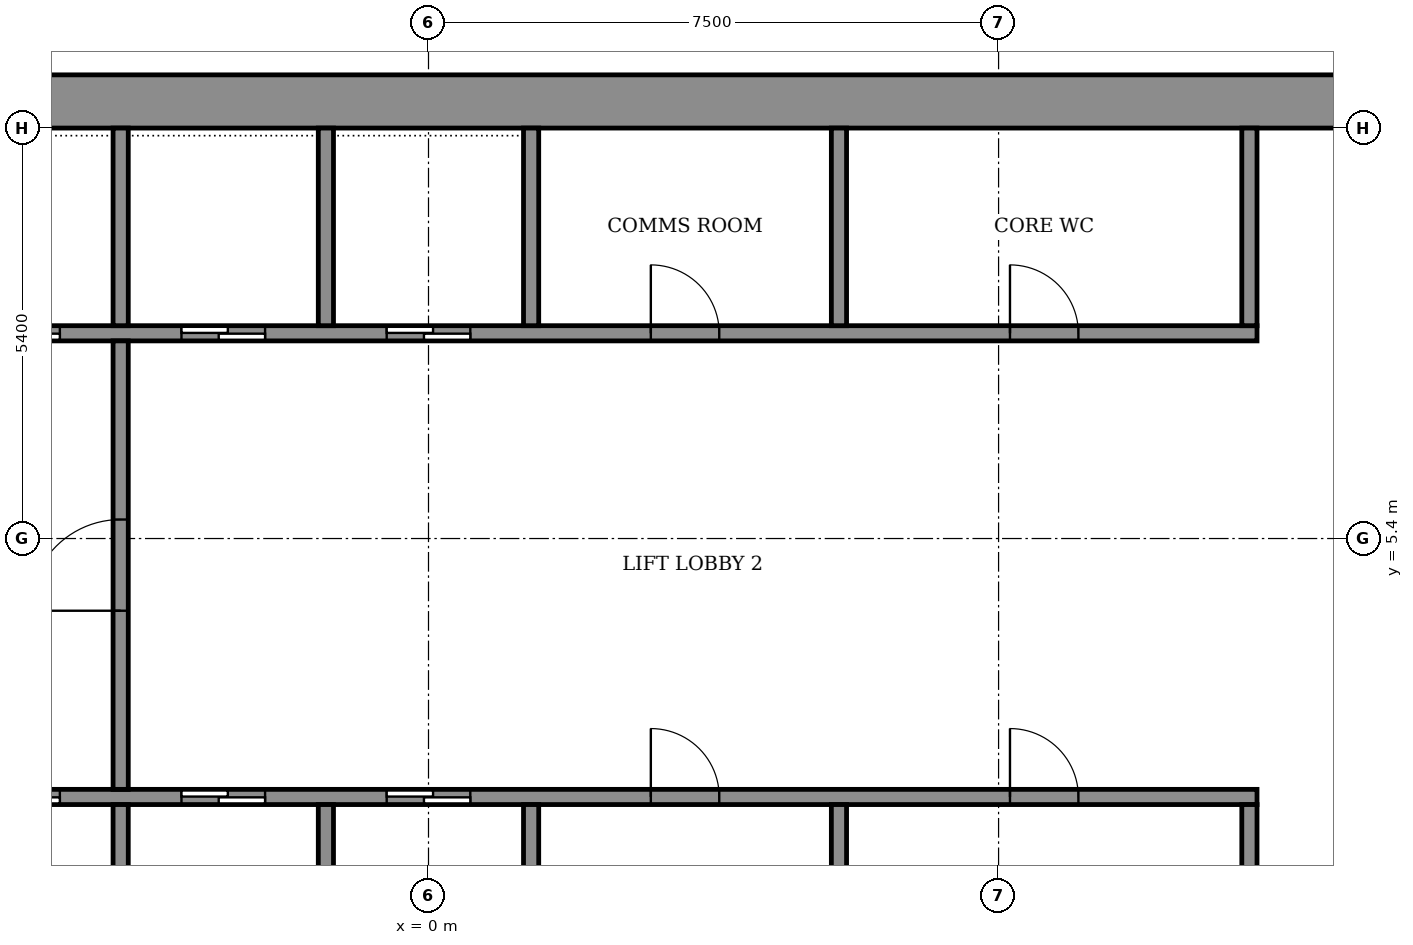
"""IFC4 building model, lengths in metres.
Left out: names, types, materials, properties, quantities, classifications, styles, units other than length and angle.
Written with IfcOpenShell. Run it as: python <this file> out.ifc"""

import sys

from ifc_helpers import new_model, si_unit, direction, frame, frame_2d, origin, place, context, subcontext, project, spatial, rectangle, extrude, element, fill, save


model = new_model("IFC4")
c1 = context("Model", 3, precision=1e-05, world=origin(), true_north=direction((0.0, 1.0)))
c2 = subcontext(c1, "Body", "Model", "MODEL_VIEW")
j1 = project(units=[si_unit("LENGTHUNIT", "METRE"), si_unit("PLANEANGLEUNIT", "RADIAN")], contexts=[c1])
p1 = place(None, origin())
s1 = spatial("IfcSite", under=j1, at=p1, CompositionType="ELEMENT")
p2 = place(p1, origin())
s2 = spatial("IfcBuilding", under=s1, at=p2, CompositionType="ELEMENT")
p3 = place(p2, frame((0.0, 0.0, 268.1)))
s3 = spatial("IfcBuildingStorey", under=s2, at=p3, CompositionType="ELEMENT", Elevation=268.1)
p4 = place(p3, frame((-14.5, 11.15, 0.0), z_axis=(0.0, 0.0, 1.0), x_axis=(1.0, 0.0, 0.0)))
e1 = element("IfcWall", 1, at=p4, inside=s3, PredefinedType="SHEAR", context=c2, shape_type="SweptSolid", body=[
    extrude(rectangle(XDim=29.0, YDim=0.7, at=frame_2d((14.5, 0.0))), origin(), (0.0, 0.0, 1.0), 3.6),
])
p5 = place(p3, frame((-10.9, 2.0, 0.0), z_axis=(0.0, 0.0, 1.0), x_axis=(1.0, 0.0, 0.0)))
e2 = element("IfcWall", 2, at=p5, inside=s3, PredefinedType="SHEAR", context=c2, shape_type="SweptSolid", body=[
    extrude(rectangle(XDim=21.8, YDim=0.2, at=frame_2d((10.9, 0.0))), origin(), (0.0, 0.0, 1.0), 3.05),
])
p6 = place(p5, frame((4.95, 0.0, 0.0)))
e3 = element("IfcOpeningElement", 3, at=p6, cuts=e2, PredefinedType="OPENING", context=c2, shape_type="SweptSolid", body=[
    extrude(rectangle(XDim=1.1, YDim=2.1, at=frame_2d((0.55, 1.05))), frame((0.0, 0.11, 0.0), z_axis=(0.0, -1.0, 0.0), x_axis=(1.0, 0.0, 0.0)), (0.0, 0.0, 1.0), 0.22),
])
p7 = place(p5, frame((7.65, 0.0, 0.0)))
e4 = element("IfcOpeningElement", 4, at=p7, cuts=e2, PredefinedType="OPENING", context=c2, shape_type="SweptSolid", body=[
    extrude(rectangle(XDim=1.1, YDim=2.1, at=frame_2d((0.55, 1.05))), frame((0.0, 0.11, 0.0), z_axis=(0.0, -1.0, 0.0), x_axis=(1.0, 0.0, 0.0)), (0.0, 0.0, 1.0), 0.22),
])
p8 = place(p5, frame((10.35, 0.0, 0.0)))
e5 = element("IfcOpeningElement", 5, at=p8, cuts=e2, PredefinedType="OPENING", context=c2, shape_type="SweptSolid", body=[
    extrude(rectangle(XDim=1.1, YDim=2.1, at=frame_2d((0.55, 1.05))), frame((0.0, 0.11, 0.0), z_axis=(0.0, -1.0, 0.0), x_axis=(1.0, 0.0, 0.0)), (0.0, 0.0, 1.0), 0.22),
])
p9 = place(p5, frame((1.675, 0.0, 0.0)))
e6 = element("IfcOpeningElement", 6, at=p9, cuts=e2, PredefinedType="OPENING", context=c2, shape_type="SweptSolid", body=[
    extrude(rectangle(XDim=0.9, YDim=2.1, at=frame_2d((0.45, 1.05))), frame((0.0, 0.11, 0.0), z_axis=(0.0, -1.0, 0.0), x_axis=(1.0, 0.0, 0.0)), (0.0, 0.0, 1.0), 0.22),
])
p10 = place(p5, frame((13.825, 0.0, 0.0)))
e7 = element("IfcOpeningElement", 7, at=p10, cuts=e2, PredefinedType="OPENING", context=c2, shape_type="SweptSolid", body=[
    extrude(rectangle(XDim=0.9, YDim=2.1, at=frame_2d((0.45, 1.05))), frame((0.0, 0.11, 0.0), z_axis=(0.0, -1.0, 0.0), x_axis=(1.0, 0.0, 0.0)), (0.0, 0.0, 1.0), 0.22),
])
p11 = place(p5, frame((18.55, 0.0, 0.0)))
e8 = element("IfcOpeningElement", 8, at=p11, cuts=e2, PredefinedType="OPENING", context=c2, shape_type="SweptSolid", body=[
    extrude(rectangle(XDim=0.9, YDim=2.1, at=frame_2d((0.45, 1.05))), frame((0.0, 0.11, 0.0), z_axis=(0.0, -1.0, 0.0), x_axis=(1.0, 0.0, 0.0)), (0.0, 0.0, 1.0), 0.22),
])
p12 = place(p3, frame((-10.9, 8.1, 0.0), z_axis=(0.0, 0.0, 1.0), x_axis=(1.0, 0.0, 0.0)))
e9 = element("IfcWall", 9, at=p12, inside=s3, PredefinedType="SHEAR", context=c2, shape_type="SweptSolid", body=[
    extrude(rectangle(XDim=21.8, YDim=0.2, at=frame_2d((10.9, 0.0))), origin(), (0.0, 0.0, 1.0), 3.05),
])
p13 = place(p12, frame((4.95, 0.0, 0.0)))
e10 = element("IfcOpeningElement", 10, at=p13, cuts=e9, PredefinedType="OPENING", context=c2, shape_type="SweptSolid", body=[
    extrude(rectangle(XDim=1.1, YDim=2.1, at=frame_2d((0.55, 1.05))), frame((0.0, 0.11, 0.0), z_axis=(0.0, -1.0, 0.0), x_axis=(1.0, 0.0, 0.0)), (0.0, 0.0, 1.0), 0.22),
])
p14 = place(p12, frame((7.65, 0.0, 0.0)))
e11 = element("IfcOpeningElement", 11, at=p14, cuts=e9, PredefinedType="OPENING", context=c2, shape_type="SweptSolid", body=[
    extrude(rectangle(XDim=1.1, YDim=2.1, at=frame_2d((0.55, 1.05))), frame((0.0, 0.11, 0.0), z_axis=(0.0, -1.0, 0.0), x_axis=(1.0, 0.0, 0.0)), (0.0, 0.0, 1.0), 0.22),
])
p15 = place(p12, frame((10.35, 0.0, 0.0)))
e12 = element("IfcOpeningElement", 12, at=p15, cuts=e9, PredefinedType="OPENING", context=c2, shape_type="SweptSolid", body=[
    extrude(rectangle(XDim=1.1, YDim=2.1, at=frame_2d((0.55, 1.05))), frame((0.0, 0.11, 0.0), z_axis=(0.0, -1.0, 0.0), x_axis=(1.0, 0.0, 0.0)), (0.0, 0.0, 1.0), 0.22),
])
p16 = place(p12, frame((1.675, 0.0, 0.0)))
e13 = element("IfcOpeningElement", 13, at=p16, cuts=e9, PredefinedType="OPENING", context=c2, shape_type="SweptSolid", body=[
    extrude(rectangle(XDim=0.9, YDim=2.1, at=frame_2d((0.45, 1.05))), frame((0.0, 0.11, 0.0), z_axis=(0.0, -1.0, 0.0), x_axis=(1.0, 0.0, 0.0)), (0.0, 0.0, 1.0), 0.22),
])
p17 = place(p12, frame((13.825, 0.0, 0.0)))
e14 = element("IfcOpeningElement", 14, at=p17, cuts=e9, PredefinedType="OPENING", context=c2, shape_type="SweptSolid", body=[
    extrude(rectangle(XDim=0.9, YDim=2.1, at=frame_2d((0.45, 1.05))), frame((0.0, 0.11, 0.0), z_axis=(0.0, -1.0, 0.0), x_axis=(1.0, 0.0, 0.0)), (0.0, 0.0, 1.0), 0.22),
])
p18 = place(p12, frame((18.55, 0.0, 0.0)))
e15 = element("IfcOpeningElement", 15, at=p18, cuts=e9, PredefinedType="OPENING", context=c2, shape_type="SweptSolid", body=[
    extrude(rectangle(XDim=0.9, YDim=2.1, at=frame_2d((0.45, 1.05))), frame((0.0, 0.11, 0.0), z_axis=(0.0, -1.0, 0.0), x_axis=(1.0, 0.0, 0.0)), (0.0, 0.0, 1.0), 0.22),
])
for number, where, z_axis, x_axis in (
    (16, (-4.05, -0.6, 0.0), (0.0, 0.0, 1.0), (0.0, 1.0, 0.0)),
    (17, (-1.35, -0.6, 0.0), (0.0, 0.0, 1.0), (0.0, 1.0, 0.0)),
    (18, (1.35, -0.6, 0.0), (0.0, 0.0, 1.0), (0.0, 1.0, 0.0)),
):
    element("IfcWall", number, at=place(p3, frame(where, z_axis=z_axis, x_axis=x_axis)), inside=s3, PredefinedType="SHEAR", context=c2, shape_type="SweptSolid", body=[
        extrude(rectangle(XDim=2.5, YDim=0.2, at=frame_2d((1.25, 0.0))), origin(), (0.0, 0.0, 1.0), 3.05),
    ])
for number, where, z_axis, x_axis in (
    (19, (5.4, -0.6, 0.0), (0.0, 0.0, 1.0), (0.0, 1.0, 0.0)),
    (20, (10.8, -0.6, 0.0), (0.0, 0.0, 1.0), (0.0, 1.0, 0.0)),
):
    element("IfcWall", number, at=place(p3, frame(where, z_axis=z_axis, x_axis=x_axis)), inside=s3, PredefinedType="STANDARD", context=c2, shape_type="SweptSolid", body=[
        extrude(rectangle(XDim=2.5, YDim=0.2, at=frame_2d((1.25, 0.0))), origin(), (0.0, 0.0, 1.0), 3.05),
    ])
for number, where, z_axis, x_axis in (
    (21, (-4.05, 8.2, 0.0), (0.0, 0.0, 1.0), (0.0, 1.0, 0.0)),
    (22, (-1.35, 8.2, 0.0), (0.0, 0.0, 1.0), (0.0, 1.0, 0.0)),
    (23, (1.35, 8.2, 0.0), (0.0, 0.0, 1.0), (0.0, 1.0, 0.0)),
):
    element("IfcWall", number, at=place(p3, frame(where, z_axis=z_axis, x_axis=x_axis)), inside=s3, PredefinedType="SHEAR", context=c2, shape_type="SweptSolid", body=[
        extrude(rectangle(XDim=2.6, YDim=0.2, at=frame_2d((1.3, 0.0))), origin(), (0.0, 0.0, 1.0), 3.05),
    ])
for number, where, z_axis, x_axis in (
    (24, (5.4, 8.2, 0.0), (0.0, 0.0, 1.0), (0.0, 1.0, 0.0)),
    (25, (10.8, 8.2, 0.0), (0.0, 0.0, 1.0), (0.0, 1.0, 0.0)),
):
    element("IfcWall", number, at=place(p3, frame(where, z_axis=z_axis, x_axis=x_axis)), inside=s3, PredefinedType="STANDARD", context=c2, shape_type="SweptSolid", body=[
        extrude(rectangle(XDim=2.6, YDim=0.2, at=frame_2d((1.3, 0.0))), origin(), (0.0, 0.0, 1.0), 3.05),
    ])
p19 = place(p3, frame((-4.05, 2.1, 0.0), z_axis=(0.0, 0.0, 1.0), x_axis=(0.0, 1.0, 0.0)))
e26 = element("IfcWall", 26, at=p19, inside=s3, PredefinedType="STANDARD", context=c2, shape_type="SweptSolid", body=[
    extrude(rectangle(XDim=5.9, YDim=0.2, at=frame_2d((2.95, 0.0))), origin(), (0.0, 0.0, 1.0), 3.05),
])
p20 = place(p19, frame((2.35, 0.0, 0.0)))
e27 = element("IfcOpeningElement", 27, at=p20, cuts=e26, PredefinedType="OPENING", context=c2, shape_type="SweptSolid", body=[
    extrude(rectangle(XDim=1.2, YDim=2.1, at=frame_2d((0.6, 1.05))), frame((0.0, 0.11, 0.0), z_axis=(0.0, -1.0, 0.0), x_axis=(1.0, 0.0, 0.0)), (0.0, 0.0, 1.0), 0.22),
])
p21 = place(p6, origin())
e28 = element("IfcDoor", 28, at=p21, inside=s3, OperationType="SLIDING_TO_LEFT", PredefinedType="DOOR", context=c2, shape_type="SweptSolid", body=[
    extrude(rectangle(XDim=1.1, YDim=2.1, at=frame_2d((0.55, 1.05))), frame((0.0, 0.025, 0.0), z_axis=(0.0, -1.0, 0.0), x_axis=(1.0, 0.0, 0.0)), (0.0, 0.0, 1.0), 0.05),
])
fill(e3, e28)
p22 = place(p7, origin())
e29 = element("IfcDoor", 29, at=p22, inside=s3, OperationType="SLIDING_TO_LEFT", PredefinedType="DOOR", context=c2, shape_type="SweptSolid", body=[
    extrude(rectangle(XDim=1.1, YDim=2.1, at=frame_2d((0.55, 1.05))), frame((0.0, 0.025, 0.0), z_axis=(0.0, -1.0, 0.0), x_axis=(1.0, 0.0, 0.0)), (0.0, 0.0, 1.0), 0.05),
])
fill(e4, e29)
p23 = place(p8, origin())
e30 = element("IfcDoor", 30, at=p23, inside=s3, OperationType="SLIDING_TO_LEFT", PredefinedType="DOOR", context=c2, shape_type="SweptSolid", body=[
    extrude(rectangle(XDim=1.1, YDim=2.1, at=frame_2d((0.55, 1.05))), frame((0.0, 0.025, 0.0), z_axis=(0.0, -1.0, 0.0), x_axis=(1.0, 0.0, 0.0)), (0.0, 0.0, 1.0), 0.05),
])
fill(e5, e30)
p24 = place(p13, origin())
e31 = element("IfcDoor", 31, at=p24, inside=s3, OperationType="SLIDING_TO_LEFT", PredefinedType="DOOR", context=c2, shape_type="SweptSolid", body=[
    extrude(rectangle(XDim=1.1, YDim=2.1, at=frame_2d((0.55, 1.05))), frame((0.0, 0.025, 0.0), z_axis=(0.0, -1.0, 0.0), x_axis=(1.0, 0.0, 0.0)), (0.0, 0.0, 1.0), 0.05),
])
fill(e10, e31)
p25 = place(p14, origin())
e32 = element("IfcDoor", 32, at=p25, inside=s3, OperationType="SLIDING_TO_LEFT", PredefinedType="DOOR", context=c2, shape_type="SweptSolid", body=[
    extrude(rectangle(XDim=1.1, YDim=2.1, at=frame_2d((0.55, 1.05))), frame((0.0, 0.025, 0.0), z_axis=(0.0, -1.0, 0.0), x_axis=(1.0, 0.0, 0.0)), (0.0, 0.0, 1.0), 0.05),
])
fill(e11, e32)
p26 = place(p15, origin())
e33 = element("IfcDoor", 33, at=p26, inside=s3, OperationType="SLIDING_TO_LEFT", PredefinedType="DOOR", context=c2, shape_type="SweptSolid", body=[
    extrude(rectangle(XDim=1.1, YDim=2.1, at=frame_2d((0.55, 1.05))), frame((0.0, 0.025, 0.0), z_axis=(0.0, -1.0, 0.0), x_axis=(1.0, 0.0, 0.0)), (0.0, 0.0, 1.0), 0.05),
])
fill(e12, e33)
p27 = place(p10, origin())
e34 = element("IfcDoor", 34, at=p27, inside=s3, OperationType="SINGLE_SWING_LEFT", PredefinedType="DOOR", context=c2, shape_type="SweptSolid", body=[
    extrude(rectangle(XDim=0.9, YDim=2.1, at=frame_2d((0.45, 1.05))), frame((0.0, 0.025, 0.0), z_axis=(0.0, -1.0, 0.0), x_axis=(1.0, 0.0, 0.0)), (0.0, 0.0, 1.0), 0.05),
])
fill(e7, e34)
p28 = place(p11, origin())
e35 = element("IfcDoor", 35, at=p28, inside=s3, OperationType="SINGLE_SWING_RIGHT", PredefinedType="DOOR", context=c2, shape_type="SweptSolid", body=[
    extrude(rectangle(XDim=0.9, YDim=2.1, at=frame_2d((0.45, 1.05))), frame((0.0, 0.025, 0.0), z_axis=(0.0, -1.0, 0.0), x_axis=(1.0, 0.0, 0.0)), (0.0, 0.0, 1.0), 0.05),
])
fill(e8, e35)
p29 = place(p17, origin())
e36 = element("IfcDoor", 36, at=p29, inside=s3, OperationType="SINGLE_SWING_LEFT", PredefinedType="DOOR", context=c2, shape_type="SweptSolid", body=[
    extrude(rectangle(XDim=0.9, YDim=2.1, at=frame_2d((0.45, 1.05))), frame((0.0, 0.025, 0.0), z_axis=(0.0, -1.0, 0.0), x_axis=(1.0, 0.0, 0.0)), (0.0, 0.0, 1.0), 0.05),
])
fill(e14, e36)
p30 = place(p18, origin())
e37 = element("IfcDoor", 37, at=p30, inside=s3, OperationType="SINGLE_SWING_RIGHT", PredefinedType="DOOR", context=c2, shape_type="SweptSolid", body=[
    extrude(rectangle(XDim=0.9, YDim=2.1, at=frame_2d((0.45, 1.05))), frame((0.0, 0.025, 0.0), z_axis=(0.0, -1.0, 0.0), x_axis=(1.0, 0.0, 0.0)), (0.0, 0.0, 1.0), 0.05),
])
fill(e15, e37)
p31 = place(p20, origin())
e38 = element("IfcDoor", 38, at=p31, inside=s3, OperationType="SINGLE_SWING_LEFT", PredefinedType="DOOR", context=c2, shape_type="SweptSolid", body=[
    extrude(rectangle(XDim=1.2, YDim=2.1, at=frame_2d((0.6, 1.05))), frame((0.0, 0.025, 0.0), z_axis=(0.0, -1.0, 0.0), x_axis=(1.0, 0.0, 0.0)), (0.0, 0.0, 1.0), 0.05),
])
fill(e27, e38)
save(model, sys.argv[1])
